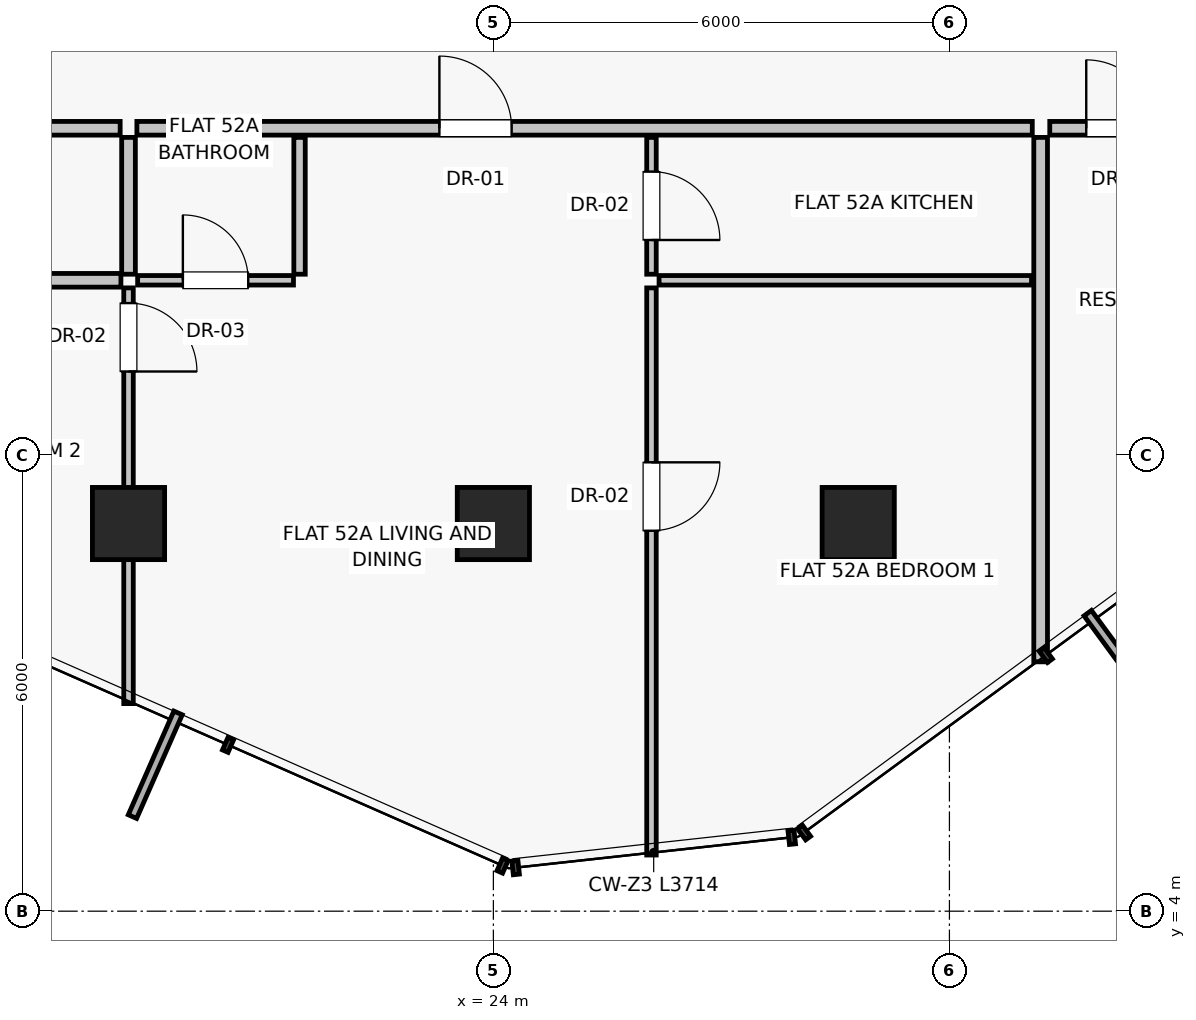
"""IFC4 building model, lengths in metres.
Left out: names, types, materials, properties, quantities, classifications, styles, units other than length and angle.
Written with IfcOpenShell. Run it as: python <this file> out.ifc"""

import sys

from ifc_helpers import new_model, si_unit, direction, frame, frame_2d, origin, origin_2d, place, context, subcontext, project, spatial, rectangle, extrude, source, transform, mapped, element, fill, save


model = new_model("IFC4")
c1 = context("Model", 3, precision=1e-05, world=origin(), true_north=direction((0.0, 1.0)))
c2 = subcontext(c1, "Body", "Model", "MODEL_VIEW")
j1 = project(units=[si_unit("LENGTHUNIT", "METRE"), si_unit("PLANEANGLEUNIT", "RADIAN")], contexts=[c1])
p1 = place(None, origin())
s1 = spatial("IfcSite", under=j1, at=p1, CompositionType="ELEMENT")
p2 = place(p1, origin())
s2 = spatial("IfcBuilding", under=s1, at=p2, CompositionType="ELEMENT")
p3 = place(p2, frame((0.0, 0.0, 185.35)))
s3 = spatial("IfcBuildingStorey", under=s2, at=p3, CompositionType="ELEMENT", Elevation=185.35)
for number, where, z_axis, x_axis in (
    (1, (19.2, 9.1, 0.0), (0.0, 0.0, 1.0), (1.0, 0.0, 0.0)),
    (2, (24.0, 9.1, 0.0), (0.0, 0.0, 1.0), (1.0, 0.0, 0.0)),
    (3, (28.8, 9.1, 0.0), (0.0, 0.0, 1.0), (1.0, 0.0, 0.0)),
):
    element("IfcColumn", number, at=place(p3, frame(where, z_axis=z_axis, x_axis=x_axis)), inside=s3, PredefinedType="COLUMN", context=c2, shape_type="SweptSolid", body=[
        extrude(rectangle(XDim=0.95, YDim=0.95, at=origin_2d()), origin(), (0.0, 0.0, 1.0), 3.25),
    ])
p4 = place(p3, frame((31.2, 14.18, 0.0), z_axis=(0.0, 0.0, 1.0), x_axis=(0.0, -1.0, 0.0)))
e4 = element("IfcWall", 4, at=p4, inside=s3, PredefinedType="PARTITIONING", context=c2, shape_type="SweptSolid", body=[
    extrude(rectangle(XDim=6.899, YDim=0.18, at=frame_2d((3.45, 0.0))), origin(), (0.0, 0.0, 1.0), 3.015),
])
p5 = place(p3, frame((15.31, 14.3, 0.0), z_axis=(0.0, 0.0, 1.0), x_axis=(1.0, 0.0, 0.0)))
e5 = element("IfcWall", 5, at=p5, inside=s3, PredefinedType="PARTITIONING", context=c2, shape_type="SweptSolid", body=[
    extrude(rectangle(XDim=3.78, YDim=0.18, at=frame_2d((1.89, 0.0))), origin(), (0.0, 0.0, 1.0), 3.015),
])
p6 = place(p5, frame((1.39, 0.0, 0.0)))
e6 = element("IfcOpeningElement", 6, at=p6, cuts=e5, PredefinedType="OPENING", context=c2, shape_type="SweptSolid", body=[
    extrude(rectangle(XDim=1.0, YDim=2.01, at=frame_2d((0.5, 1.005))), frame((0.0, 0.1, 0.0), z_axis=(0.0, -1.0, 0.0), x_axis=(1.0, 0.0, 0.0)), (0.0, 0.0, 1.0), 0.2),
])
p7 = place(p3, frame((19.31, 14.3, 0.0), z_axis=(0.0, 0.0, 1.0), x_axis=(1.0, 0.0, 0.0)))
e7 = element("IfcWall", 7, at=p7, inside=s3, PredefinedType="PARTITIONING", context=c2, shape_type="SweptSolid", body=[
    extrude(rectangle(XDim=11.78, YDim=0.18, at=frame_2d((5.89, 0.0))), origin(), (0.0, 0.0, 1.0), 3.015),
])
p8 = place(p7, frame((3.98, 0.0, 0.0)))
e8 = element("IfcOpeningElement", 8, at=p8, cuts=e7, PredefinedType="OPENING", context=c2, shape_type="SweptSolid", body=[
    extrude(rectangle(XDim=0.95, YDim=2.02, at=frame_2d((0.475, 1.01))), frame((0.0, 0.1, 0.0), z_axis=(0.0, -1.0, 0.0), x_axis=(1.0, 0.0, 0.0)), (0.0, 0.0, 1.0), 0.2),
])
p9 = place(p3, frame((15.32, 12.3, 0.0), z_axis=(0.0, 0.0, 1.0), x_axis=(1.0, 0.0, 0.0)))
e9 = element("IfcWall", 9, at=p9, inside=s3, PredefinedType="PARTITIONING", context=c2, shape_type="SweptSolid", body=[
    extrude(rectangle(XDim=3.78, YDim=0.18, at=frame_2d((1.89, 0.0))), origin(), (0.0, 0.0, 1.0), 3.015),
])
p10 = place(p3, frame((19.2, 14.18, 0.0), z_axis=(0.0, 0.0, 1.0), x_axis=(0.0, -1.0, 0.0)))
e10 = element("IfcWall", 10, at=p10, inside=s3, PredefinedType="PARTITIONING", context=c2, shape_type="SweptSolid", body=[
    extrude(rectangle(XDim=1.8, YDim=0.18, at=frame_2d((0.9, 0.0))), origin(), (0.0, 0.0, 1.0), 3.015),
])
p11 = place(p3, frame((19.2, 12.2, 0.0), z_axis=(0.0, 0.0, 1.0), x_axis=(0.0, -1.0, 0.0)))
e11 = element("IfcWall", 11, at=p11, inside=s3, PredefinedType="PARTITIONING", context=c2, shape_type="SweptSolid", body=[
    extrude(rectangle(XDim=5.469, YDim=0.125, at=frame_2d((2.734, 0.0))), origin(), (0.0, 0.0, 1.0), 2.469),
])
p12 = place(p11, frame((0.2, 0.0, 0.0)))
e12 = element("IfcOpeningElement", 12, at=p12, cuts=e11, PredefinedType="OPENING", context=c2, shape_type="SweptSolid", body=[
    extrude(rectangle(XDim=0.9, YDim=2.01, at=frame_2d((0.45, 1.005))), frame((0.0, 0.073, 0.0), z_axis=(0.0, -1.0, 0.0), x_axis=(1.0, 0.0, 0.0)), (0.0, 0.0, 1.0), 0.145),
])
p13 = place(p3, frame((21.45, 14.18, 0.0), z_axis=(0.0, 0.0, 1.0), x_axis=(0.0, -1.0, 0.0)))
e13 = element("IfcWall", 13, at=p13, inside=s3, PredefinedType="PARTITIONING", context=c2, shape_type="SweptSolid", body=[
    extrude(rectangle(XDim=1.8, YDim=0.15, at=frame_2d((0.9, 0.0))), origin(), (0.0, 0.0, 1.0), 3.015),
])
p14 = place(p3, frame((19.32, 12.3, 0.0), z_axis=(0.0, 0.0, 1.0), x_axis=(1.0, 0.0, 0.0)))
e14 = element("IfcWall", 14, at=p14, inside=s3, PredefinedType="PARTITIONING", context=c2, shape_type="SweptSolid", body=[
    extrude(rectangle(XDim=2.05, YDim=0.125, at=frame_2d((1.025, 0.0))), origin(), (0.0, 0.0, 1.0), 3.015),
])
p15 = place(p14, frame((0.595, 0.0, 0.0)))
e15 = element("IfcOpeningElement", 15, at=p15, cuts=e14, PredefinedType="OPENING", context=c2, shape_type="SweptSolid", body=[
    extrude(rectangle(XDim=0.86, YDim=2.01, at=frame_2d((0.43, 1.005))), frame((0.0, 0.073, 0.0), z_axis=(0.0, -1.0, 0.0), x_axis=(1.0, 0.0, 0.0)), (0.0, 0.0, 1.0), 0.145),
])
p16 = place(p3, frame((26.08, 14.18, 0.0), z_axis=(0.0, 0.0, 1.0), x_axis=(0.0, -1.0, 0.0)))
e16 = element("IfcWall", 16, at=p16, inside=s3, PredefinedType="PARTITIONING", context=c2, shape_type="SweptSolid", body=[
    extrude(rectangle(XDim=1.8, YDim=0.125, at=frame_2d((0.9, 0.0))), origin(), (0.0, 0.0, 1.0), 3.015),
])
p17 = place(p16, frame((0.45, 0.0, 0.0)))
e17 = element("IfcOpeningElement", 17, at=p17, cuts=e16, PredefinedType="OPENING", context=c2, shape_type="SweptSolid", body=[
    extrude(rectangle(XDim=0.9, YDim=2.01, at=frame_2d((0.45, 1.005))), frame((0.0, 0.073, 0.0), z_axis=(0.0, -1.0, 0.0), x_axis=(1.0, 0.0, 0.0)), (0.0, 0.0, 1.0), 0.145),
])
p18 = place(p3, frame((26.18, 12.3, 0.0), z_axis=(0.0, 0.0, 1.0), x_axis=(1.0, 0.0, 0.0)))
e18 = element("IfcWall", 18, at=p18, inside=s3, PredefinedType="PARTITIONING", context=c2, shape_type="SweptSolid", body=[
    extrude(rectangle(XDim=4.9, YDim=0.125, at=frame_2d((2.45, 0.0))), origin(), (0.0, 0.0, 1.0), 3.015),
])
p19 = place(p3, frame((26.08, 12.2, 0.0), z_axis=(0.0, 0.0, 1.0), x_axis=(0.0, -1.0, 0.0)))
e19 = element("IfcWall", 19, at=p19, inside=s3, PredefinedType="PARTITIONING", context=c2, shape_type="SweptSolid", body=[
    extrude(rectangle(XDim=7.461, YDim=0.125, at=frame_2d((3.73, 0.0))), origin(), (0.0, 0.0, 1.0), 3.015),
])
p20 = place(p19, frame((2.295, 0.0, 0.0)))
e20 = element("IfcOpeningElement", 20, at=p20, cuts=e19, PredefinedType="OPENING", context=c2, shape_type="SweptSolid", body=[
    extrude(rectangle(XDim=0.9, YDim=2.01, at=frame_2d((0.45, 1.005))), frame((0.0, 0.073, 0.0), z_axis=(0.0, -1.0, 0.0), x_axis=(1.0, 0.0, 0.0)), (0.0, 0.0, 1.0), 0.145),
])
p21 = place(p3, frame((31.32, 14.3, 0.0), z_axis=(0.0, 0.0, 1.0), x_axis=(1.0, 0.0, 0.0)))
e21 = element("IfcWall", 21, at=p21, inside=s3, PredefinedType="PARTITIONING", context=c2, shape_type="SweptSolid", body=[
    extrude(rectangle(XDim=1.86, YDim=0.18, at=frame_2d((0.93, 0.0))), origin(), (0.0, 0.0, 1.0), 3.015),
])
p22 = place(p21, frame((0.48, 0.0, 0.0)))
e22 = element("IfcOpeningElement", 22, at=p22, cuts=e21, PredefinedType="OPENING", context=c2, shape_type="SweptSolid", body=[
    extrude(rectangle(XDim=0.9, YDim=2.01, at=frame_2d((0.45, 1.005))), frame((0.0, 0.1, 0.0), z_axis=(0.0, -1.0, 0.0), x_axis=(1.0, 0.0, 0.0)), (0.0, 0.0, 1.0), 0.2),
])
m1 = source(origin(), c2, "Body", "SweptSolid", [
    extrude(rectangle(XDim=0.95, YDim=2.02, at=frame_2d((0.475, 1.01))), frame((0.0, 0.025, 0.0), z_axis=(0.0, -1.0, 0.0), x_axis=(1.0, 0.0, 0.0)), (0.0, 0.0, 1.0), 0.05),
])
p23 = place(p8, origin())
e23 = element("IfcDoor", 23, at=p23, inside=s3, OperationType="SINGLE_SWING_LEFT", PredefinedType="DOOR", context=c2, shape_type="MappedRepresentation", body=[
    mapped(m1, transform((0.0, 0.0, 0.0), scale=1.0)),
])
fill(e8, e23)
m2 = source(origin(), c2, "Body", "SweptSolid", [
    extrude(rectangle(XDim=0.9, YDim=2.01, at=frame_2d((0.45, 1.005))), frame((0.0, 0.025, 0.0), z_axis=(0.0, -1.0, 0.0), x_axis=(1.0, 0.0, 0.0)), (0.0, 0.0, 1.0), 0.05),
])
p24 = place(p12, origin())
e24 = element("IfcDoor", 24, at=p24, inside=s3, OperationType="SINGLE_SWING_RIGHT", PredefinedType="DOOR", context=c2, shape_type="MappedRepresentation", body=[
    mapped(m2, transform((0.0, 0.0, 0.0), scale=1.0)),
])
fill(e12, e24)
m3 = source(origin(), c2, "Body", "SweptSolid", [
    extrude(rectangle(XDim=0.86, YDim=2.01, at=frame_2d((0.43, 1.005))), frame((0.0, 0.025, 0.0), z_axis=(0.0, -1.0, 0.0), x_axis=(1.0, 0.0, 0.0)), (0.0, 0.0, 1.0), 0.05),
])
p25 = place(p15, origin())
e25 = element("IfcDoor", 25, at=p25, inside=s3, OperationType="SINGLE_SWING_LEFT", PredefinedType="DOOR", context=c2, shape_type="MappedRepresentation", body=[
    mapped(m3, transform((0.0, 0.0, 0.0), scale=1.0)),
])
fill(e15, e25)
p26 = place(p17, origin())
e26 = element("IfcDoor", 26, at=p26, inside=s3, OperationType="SINGLE_SWING_RIGHT", PredefinedType="DOOR", context=c2, shape_type="MappedRepresentation", body=[
    mapped(m2, transform((0.0, 0.0, 0.0), scale=1.0)),
])
fill(e17, e26)
p27 = place(p20, origin())
e27 = element("IfcDoor", 27, at=p27, inside=s3, OperationType="SINGLE_SWING_LEFT", PredefinedType="DOOR", context=c2, shape_type="MappedRepresentation", body=[
    mapped(m2, transform((0.0, 0.0, 0.0), scale=1.0)),
])
fill(e20, e27)
p28 = place(p22, origin())
e28 = element("IfcDoor", 28, at=p28, inside=s3, OperationType="SINGLE_SWING_LEFT", PredefinedType="DOOR", context=c2, shape_type="MappedRepresentation", body=[
    mapped(m2, transform((0.0, 0.0, 0.0), scale=1.0)),
])
fill(e22, e28)
save(model, sys.argv[1])
